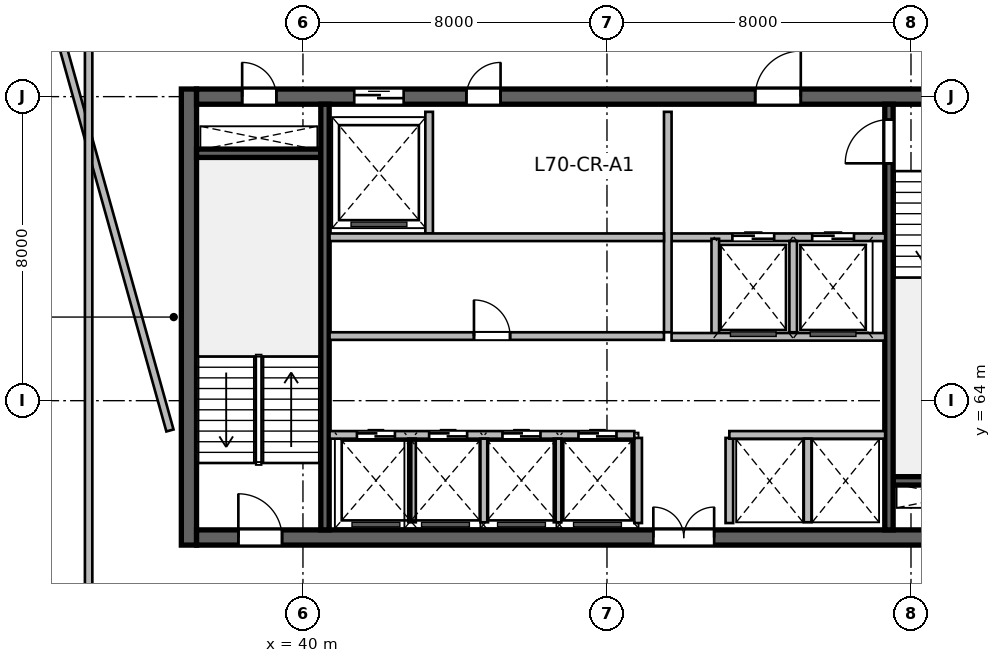
"""IFC4 building model, lengths in metres.
Left out: names, types, materials, properties, quantities, classifications, styles, units other than length and angle.
Written with IfcOpenShell. Run it as: python <this file> out.ifc"""

import sys

from ifc_helpers import new_model, si_unit, direction, frame, frame_2d, origin, place, context, subcontext, project, spatial, rectangle, extrude, source, transform, mapped, element, fill, save


model = new_model("IFC4")
c1 = context("Model", 3, precision=1e-05, world=origin(), true_north=direction((0.0, 1.0)))
c2 = subcontext(c1, "Body", "Model", "MODEL_VIEW")
j1 = project(units=[si_unit("LENGTHUNIT", "METRE"), si_unit("PLANEANGLEUNIT", "RADIAN")], contexts=[c1])
p1 = place(None, origin())
s1 = spatial("IfcSite", under=j1, at=p1, CompositionType="ELEMENT")
p2 = place(p1, origin())
s2 = spatial("IfcBuilding", under=s1, at=p2, CompositionType="ELEMENT")
p3 = place(p2, frame((0.0, 0.0, 287.4)))
s3 = spatial("IfcBuildingStorey", under=s2, at=p3, CompositionType="ELEMENT", Elevation=287.4)
m1 = source(origin(), c2, "Body", "SweptSolid", [
    extrude(rectangle(XDim=12.0, YDim=0.4, at=frame_2d((6.0, 0.0))), origin(), (0.0, 0.0, 1.0), 3.9),
])
p4 = place(p3, frame((37.0, 60.2, 0.0), z_axis=(0.0, 0.0, 1.0), x_axis=(0.0, 1.0, 0.0)))
e1 = element("IfcWall", 1, at=p4, inside=s3, PredefinedType="SHEAR", context=c2, shape_type="MappedRepresentation", body=[
    mapped(m1, transform((0.0, 0.0, 0.0), scale=1.0)),
])
m2 = source(origin(), c2, "Body", "SweptSolid", [
    extrude(rectangle(XDim=21.6, YDim=0.4, at=frame_2d((10.8, 0.0))), origin(), (0.0, 0.0, 1.0), 3.9),
])
p5 = place(p3, frame((37.2, 60.4, 0.0), z_axis=(0.0, 0.0, 1.0), x_axis=(1.0, 0.0, 0.0)))
e2 = element("IfcWall", 2, at=p5, inside=s3, PredefinedType="SHEAR", context=c2, shape_type="MappedRepresentation", body=[
    mapped(m2, transform((0.0, 0.0, 0.0), scale=1.0)),
])
p6 = place(p5, frame((1.1, 0.0, 0.0)))
e3 = element("IfcOpeningElement", 3, at=p6, cuts=e2, PredefinedType="OPENING", context=c2, shape_type="SweptSolid", body=[
    extrude(rectangle(XDim=1.15, YDim=2.15, at=frame_2d((0.575, 1.075))), frame((0.0, 0.21, 0.0), z_axis=(0.0, -1.0, 0.0), x_axis=(1.0, 0.0, 0.0)), (0.0, 0.0, 1.0), 0.42),
])
p7 = place(p5, frame((19.5, 0.0, 0.0)))
e4 = element("IfcOpeningElement", 4, at=p7, cuts=e2, PredefinedType="OPENING", context=c2, shape_type="SweptSolid", body=[
    extrude(rectangle(XDim=0.9, YDim=2.1, at=frame_2d((0.45, 1.05))), frame((0.0, 0.21, 0.0), z_axis=(0.0, -1.0, 0.0), x_axis=(1.0, 0.0, 0.0)), (0.0, 0.0, 1.0), 0.42),
])
p8 = place(p5, frame((12.02, 0.0, 0.0)))
e5 = element("IfcOpeningElement", 5, at=p8, cuts=e2, PredefinedType="OPENING", context=c2, shape_type="SweptSolid", body=[
    extrude(rectangle(XDim=1.6, YDim=2.15, at=frame_2d((0.8, 1.075))), frame((0.0, 0.21, 0.0), z_axis=(0.0, -1.0, 0.0), x_axis=(1.0, 0.0, 0.0)), (0.0, 0.0, 1.0), 0.42),
])
p9 = place(p3, frame((37.2, 72.0, 0.0), z_axis=(0.0, 0.0, 1.0), x_axis=(1.0, 0.0, 0.0)))
e6 = element("IfcWall", 6, at=p9, inside=s3, PredefinedType="SHEAR", context=c2, shape_type="MappedRepresentation", body=[
    mapped(m2, transform((0.0, 0.0, 0.0), scale=1.0)),
])
p10 = place(p9, frame((1.2, 0.0, 0.0)))
e7 = element("IfcOpeningElement", 7, at=p10, cuts=e6, PredefinedType="OPENING", context=c2, shape_type="SweptSolid", body=[
    extrude(rectangle(XDim=0.9, YDim=2.1, at=frame_2d((0.45, 1.05))), frame((0.0, 0.21, 0.0), z_axis=(0.0, -1.0, 0.0), x_axis=(1.0, 0.0, 0.0)), (0.0, 0.0, 1.0), 0.42),
])
p11 = place(p9, frame((14.7, 0.0, 0.0)))
e8 = element("IfcOpeningElement", 8, at=p11, cuts=e6, PredefinedType="OPENING", context=c2, shape_type="SweptSolid", body=[
    extrude(rectangle(XDim=1.2, YDim=2.15, at=frame_2d((0.6, 1.075))), frame((0.0, 0.21, 0.0), z_axis=(0.0, -1.0, 0.0), x_axis=(1.0, 0.0, 0.0)), (0.0, 0.0, 1.0), 0.42),
])
p12 = place(p9, frame((4.15, 0.0, 0.0)))
e9 = element("IfcOpeningElement", 9, at=p12, cuts=e6, PredefinedType="OPENING", context=c2, shape_type="SweptSolid", body=[
    extrude(rectangle(XDim=1.3, YDim=2.15, at=frame_2d((0.65, 1.075))), frame((0.0, 0.21, 0.0), z_axis=(0.0, -1.0, 0.0), x_axis=(1.0, 0.0, 0.0)), (0.0, 0.0, 1.0), 0.42),
])
p13 = place(p9, frame((7.1, 0.0, 0.0)))
e10 = element("IfcOpeningElement", 10, at=p13, cuts=e6, PredefinedType="OPENING", context=c2, shape_type="SweptSolid", body=[
    extrude(rectangle(XDim=0.9, YDim=2.1, at=frame_2d((0.45, 1.05))), frame((0.0, 0.21, 0.0), z_axis=(0.0, -1.0, 0.0), x_axis=(1.0, 0.0, 0.0)), (0.0, 0.0, 1.0), 0.42),
])
m3 = source(origin(), c2, "Body", "SweptSolid", [
    extrude(rectangle(XDim=3.27, YDim=0.22, at=frame_2d((1.635, 0.0))), origin(), (0.0, 0.0, 1.0), 3.9),
])
for number, where, z_axis, x_axis in (
    (11, (37.2, 70.51, 0.0), (0.0, 0.0, 1.0), (1.0, 0.0, 0.0)),
    (12, (55.53, 61.89, 0.0), (0.0, 0.0, 1.0), (1.0, 0.0, 0.0)),
):
    element("IfcWall", number, at=place(p3, frame(where, z_axis=z_axis, x_axis=x_axis)), inside=s3, PredefinedType="SHEAR", context=c2, shape_type="MappedRepresentation", body=[
        mapped(m3, transform((0.0, 0.0, 0.0), scale=1.0)),
    ])
m4 = source(origin(), c2, "Body", "SweptSolid", [
    extrude(rectangle(XDim=11.2, YDim=0.22, at=frame_2d((5.6, 0.0))), origin(), (0.0, 0.0, 1.0), 3.9),
])
p14 = place(p3, frame((40.58, 60.6, 0.0), z_axis=(0.0, 0.0, 1.0), x_axis=(0.0, 1.0, 0.0)))
e13 = element("IfcWall", 13, at=p14, inside=s3, PredefinedType="SHEAR", context=c2, shape_type="MappedRepresentation", body=[
    mapped(m4, transform((0.0, 0.0, 0.0), scale=1.0)),
])
p15 = place(p3, frame((55.42, 60.6, 0.0), z_axis=(0.0, 0.0, 1.0), x_axis=(0.0, 1.0, 0.0)))
e14 = element("IfcWall", 14, at=p15, inside=s3, PredefinedType="SHEAR", context=c2, shape_type="MappedRepresentation", body=[
    mapped(m4, transform((0.0, 0.0, 0.0), scale=1.0)),
])
p16 = place(p15, frame((9.645, 0.0, 0.0)))
e15 = element("IfcOpeningElement", 15, at=p16, cuts=e14, PredefinedType="OPENING", context=c2, shape_type="SweptSolid", body=[
    extrude(rectangle(XDim=1.15, YDim=2.15, at=frame_2d((0.575, 1.075))), frame((0.0, 0.12, 0.0), z_axis=(0.0, -1.0, 0.0), x_axis=(1.0, 0.0, 0.0)), (0.0, 0.0, 1.0), 0.24),
])
m5 = source(origin(), c2, "Body", "SweptSolid", [
    extrude(rectangle(XDim=2.24, YDim=0.2, at=frame_2d((1.12, 0.0))), origin(), (0.0, 0.0, 1.0), 3.64),
])
for number, where, z_axis, x_axis in (
    (16, (48.82, 60.78, 0.0), (0.0, 0.0, 1.0), (0.0, 1.0, 0.0)),
    (17, (51.22, 60.78, 0.0), (0.0, 0.0, 1.0), (0.0, 1.0, 0.0)),
):
    element("IfcWall", number, at=place(p3, frame(where, z_axis=z_axis, x_axis=x_axis)), inside=s3, PredefinedType="SOLIDWALL", context=c2, shape_type="MappedRepresentation", body=[
        mapped(m5, transform((0.0, 0.0, 0.0), scale=1.0)),
    ])
m6 = source(origin(), c2, "Body", "SweptSolid", [
    extrude(rectangle(XDim=5.62, YDim=0.2, at=frame_2d((2.81, 0.0))), origin(), (0.0, 0.0, 1.0), 3.64),
])
p17 = place(p3, frame((49.7, 68.3, 0.0), z_axis=(0.0, 0.0, 1.0), x_axis=(1.0, 0.0, 0.0)))
e18 = element("IfcWall", 18, at=p17, inside=s3, PredefinedType="SOLIDWALL", context=c2, shape_type="MappedRepresentation", body=[
    mapped(m6, transform((0.0, 0.0, 0.0), scale=1.0)),
])
p18 = place(p17, frame((1.6, 0.0, 0.0)))
e19 = element("IfcOpeningElement", 19, at=p18, cuts=e18, PredefinedType="OPENING", context=c2, shape_type="SweptSolid", body=[
    extrude(rectangle(XDim=1.1, YDim=2.15, at=frame_2d((0.55, 1.075))), frame((0.0, 0.11, 0.0), z_axis=(0.0, -1.0, 0.0), x_axis=(1.0, 0.0, 0.0)), (0.0, 0.0, 1.0), 0.22),
])
p19 = place(p17, frame((3.7, 0.0, 0.0)))
e20 = element("IfcOpeningElement", 20, at=p19, cuts=e18, PredefinedType="OPENING", context=c2, shape_type="SweptSolid", body=[
    extrude(rectangle(XDim=1.1, YDim=2.15, at=frame_2d((0.55, 1.075))), frame((0.0, 0.11, 0.0), z_axis=(0.0, -1.0, 0.0), x_axis=(1.0, 0.0, 0.0)), (0.0, 0.0, 1.0), 0.22),
])
m7 = source(origin(), c2, "Body", "SweptSolid", [
    extrude(rectangle(XDim=5.8, YDim=0.2, at=frame_2d((2.9, 0.0))), origin(), (0.0, 0.0, 1.0), 3.64),
])
p20 = place(p3, frame((49.6, 65.8, 0.0), z_axis=(0.0, 0.0, 1.0), x_axis=(0.0, 1.0, 0.0)))
e21 = element("IfcWall", 21, at=p20, inside=s3, PredefinedType="SOLIDWALL", context=c2, shape_type="MappedRepresentation", body=[
    mapped(m7, transform((0.0, 0.0, 0.0), scale=1.0)),
])
m8 = source(origin(), c2, "Body", "SweptSolid", [
    extrude(rectangle(XDim=2.58, YDim=0.2, at=frame_2d((1.29, 0.0))), origin(), (0.0, 0.0, 1.0), 3.64),
])
p21 = place(p3, frame((50.85, 65.68, 0.0), z_axis=(0.0, 0.0, 1.0), x_axis=(0.0, 1.0, 0.0)))
e22 = element("IfcWall", 22, at=p21, inside=s3, PredefinedType="SOLIDWALL", context=c2, shape_type="MappedRepresentation", body=[
    mapped(m8, transform((0.0, 0.0, 0.0), scale=1.0)),
])
m9 = source(origin(), c2, "Body", "SweptSolid", [
    extrude(rectangle(XDim=2.4, YDim=0.2, at=frame_2d((1.2, 0.0))), origin(), (0.0, 0.0, 1.0), 3.64),
])
p22 = place(p3, frame((52.9, 65.8, 0.0), z_axis=(0.0, 0.0, 1.0), x_axis=(0.0, 1.0, 0.0)))
e23 = element("IfcWall", 23, at=p22, inside=s3, PredefinedType="SOLIDWALL", context=c2, shape_type="MappedRepresentation", body=[
    mapped(m9, transform((0.0, 0.0, 0.0), scale=1.0)),
])
p23 = place(p3, frame((49.7, 65.68, 0.0), z_axis=(0.0, 0.0, 1.0), x_axis=(1.0, 0.0, 0.0)))
e24 = element("IfcWall", 24, at=p23, inside=s3, PredefinedType="SOLIDWALL", context=c2, shape_type="MappedRepresentation", body=[
    mapped(m6, transform((0.0, 0.0, 0.0), scale=1.0)),
])
m10 = source(origin(), c2, "Body", "SweptSolid", [
    extrude(rectangle(XDim=3.2, YDim=0.2, at=frame_2d((1.6, 0.0))), origin(), (0.0, 0.0, 1.0), 3.64),
])
p24 = place(p3, frame((43.32, 68.4, 0.0), z_axis=(0.0, 0.0, 1.0), x_axis=(0.0, 1.0, 0.0)))
e25 = element("IfcWall", 25, at=p24, inside=s3, PredefinedType="SOLIDWALL", context=c2, shape_type="MappedRepresentation", body=[
    mapped(m10, transform((0.0, 0.0, 0.0), scale=1.0)),
])
m11 = source(origin(), c2, "Body", "SweptSolid", [
    extrude(rectangle(XDim=8.8, YDim=0.2, at=frame_2d((4.4, 0.0))), origin(), (0.0, 0.0, 1.0), 3.64),
])
p25 = place(p3, frame((40.7, 68.3, 0.0), z_axis=(0.0, 0.0, 1.0), x_axis=(1.0, 0.0, 0.0)))
e26 = element("IfcWall", 26, at=p25, inside=s3, PredefinedType="SOLIDWALL", context=c2, shape_type="MappedRepresentation", body=[
    mapped(m11, transform((0.0, 0.0, 0.0), scale=1.0)),
])
m12 = source(origin(), c2, "Body", "SweptSolid", [
    extrude(rectangle(XDim=8.02, YDim=0.2, at=frame_2d((4.01, 0.0))), origin(), (0.0, 0.0, 1.0), 3.64),
])
p26 = place(p3, frame((40.7, 63.1, 0.0), z_axis=(0.0, 0.0, 1.0), x_axis=(1.0, 0.0, 0.0)))
e27 = element("IfcWall", 27, at=p26, inside=s3, PredefinedType="SOLIDWALL", context=c2, shape_type="MappedRepresentation", body=[
    mapped(m12, transform((0.0, 0.0, 0.0), scale=1.0)),
])
p27 = place(p26, frame((0.72, 0.0, 0.0)))
e28 = element("IfcOpeningElement", 28, at=p27, cuts=e27, PredefinedType="OPENING", context=c2, shape_type="SweptSolid", body=[
    extrude(rectangle(XDim=1.0, YDim=2.15, at=frame_2d((0.5, 1.075))), frame((0.0, 0.11, 0.0), z_axis=(0.0, -1.0, 0.0), x_axis=(1.0, 0.0, 0.0)), (0.0, 0.0, 1.0), 0.22),
])
p28 = place(p26, frame((2.62, 0.0, 0.0)))
e29 = element("IfcOpeningElement", 29, at=p28, cuts=e27, PredefinedType="OPENING", context=c2, shape_type="SweptSolid", body=[
    extrude(rectangle(XDim=1.0, YDim=2.15, at=frame_2d((0.5, 1.075))), frame((0.0, 0.11, 0.0), z_axis=(0.0, -1.0, 0.0), x_axis=(1.0, 0.0, 0.0)), (0.0, 0.0, 1.0), 0.22),
])
p29 = place(p26, frame((4.55, 0.0, 0.0)))
e30 = element("IfcOpeningElement", 30, at=p29, cuts=e27, PredefinedType="OPENING", context=c2, shape_type="SweptSolid", body=[
    extrude(rectangle(XDim=1.0, YDim=2.15, at=frame_2d((0.5, 1.075))), frame((0.0, 0.11, 0.0), z_axis=(0.0, -1.0, 0.0), x_axis=(1.0, 0.0, 0.0)), (0.0, 0.0, 1.0), 0.22),
])
p30 = place(p26, frame((6.55, 0.0, 0.0)))
e31 = element("IfcOpeningElement", 31, at=p30, cuts=e27, PredefinedType="OPENING", context=c2, shape_type="SweptSolid", body=[
    extrude(rectangle(XDim=1.0, YDim=2.15, at=frame_2d((0.5, 1.075))), frame((0.0, 0.11, 0.0), z_axis=(0.0, -1.0, 0.0), x_axis=(1.0, 0.0, 0.0)), (0.0, 0.0, 1.0), 0.22),
])
m13 = source(origin(), c2, "Body", "SweptSolid", [
    extrude(rectangle(XDim=4.1, YDim=0.2, at=frame_2d((2.05, 0.0))), origin(), (0.0, 0.0, 1.0), 3.64),
])
p31 = place(p3, frame((51.22, 63.1, 0.0), z_axis=(0.0, 0.0, 1.0), x_axis=(1.0, 0.0, 0.0)))
e32 = element("IfcWall", 32, at=p31, inside=s3, PredefinedType="SOLIDWALL", context=c2, shape_type="MappedRepresentation", body=[
    mapped(m13, transform((0.0, 0.0, 0.0), scale=1.0)),
])
m14 = source(origin(), c2, "Body", "SweptSolid", [
    extrude(rectangle(XDim=2.2, YDim=0.2, at=frame_2d((1.1, 0.0))), origin(), (0.0, 0.0, 1.0), 3.64),
])
for number, where, z_axis, x_axis in (
    (33, (42.87, 60.8, 0.0), (0.0, 0.0, 1.0), (0.0, 1.0, 0.0)),
    (34, (44.77, 60.8, 0.0), (0.0, 0.0, 1.0), (0.0, 1.0, 0.0)),
    (35, (46.7, 60.8, 0.0), (0.0, 0.0, 1.0), (0.0, 1.0, 0.0)),
    (36, (53.28, 60.8, 0.0), (0.0, 0.0, 1.0), (0.0, 1.0, 0.0)),
):
    element("IfcWall", number, at=place(p3, frame(where, z_axis=z_axis, x_axis=x_axis)), inside=s3, PredefinedType="SOLIDWALL", context=c2, shape_type="MappedRepresentation", body=[
        mapped(m14, transform((0.0, 0.0, 0.0), scale=1.0)),
    ])
p32 = place(p3, frame((40.7, 65.7, 0.0), z_axis=(0.0, 0.0, 1.0), x_axis=(1.0, 0.0, 0.0)))
e37 = element("IfcWall", 37, at=p32, inside=s3, PredefinedType="SOLIDWALL", context=c2, shape_type="MappedRepresentation", body=[
    mapped(m11, transform((0.0, 0.0, 0.0), scale=1.0)),
])
p33 = place(p32, frame((3.8, 0.0, 0.0)))
e38 = element("IfcOpeningElement", 38, at=p33, cuts=e37, PredefinedType="OPENING", context=c2, shape_type="SweptSolid", body=[
    extrude(rectangle(XDim=0.95, YDim=2.15, at=frame_2d((0.475, 1.075))), frame((0.0, 0.11, 0.0), z_axis=(0.0, -1.0, 0.0), x_axis=(1.0, 0.0, 0.0)), (0.0, 0.0, 1.0), 0.22),
])
m15 = source(origin(), c2, "Body", "SweptSolid", [
    extrude(rectangle(XDim=17.556, YDim=0.195, at=frame_2d((8.778, 0.0))), origin(), (0.0, 0.0, 1.0), 3.64),
])
p34 = place(p3, frame((33.8, 54.958, 0.0), z_axis=(0.0, 0.0, 1.0), x_axis=(-0.395687598313, 0.918385172213, 0.0)))
e39 = element("IfcWall", 39, at=p34, inside=s3, PredefinedType="PARTITIONING", context=c2, shape_type="MappedRepresentation", body=[
    mapped(m15, transform((0.0, 0.0, 0.0), scale=1.0)),
])
m16 = source(origin(), c2, "Body", "SweptSolid", [
    extrude(rectangle(XDim=12.311, YDim=0.195, at=frame_2d((6.155, 0.0))), origin(), (0.0, 0.0, 1.0), 3.64),
])
p35 = place(p3, frame((36.5, 63.216, 0.0), z_axis=(0.0, 0.0, 1.0), x_axis=(-0.268759602651, 0.963207286093, 0.0)))
e40 = element("IfcWall", 40, at=p35, inside=s3, PredefinedType="PARTITIONING", context=c2, shape_type="MappedRepresentation", body=[
    mapped(m16, transform((0.0, 0.0, 0.0), scale=1.0)),
])
m17 = source(origin(), c2, "Body", "SweptSolid", [
    extrude(rectangle(XDim=17.681, YDim=0.195, at=frame_2d((8.84, 0.0))), origin(), (0.0, 0.0, 1.0), 3.64),
])
p36 = place(p3, frame((34.36, 57.96, 0.0), z_axis=(0.0, 0.0, 1.0), x_axis=(0.0, 1.0, 0.0)))
e41 = element("IfcWall", 41, at=p36, inside=s3, PredefinedType="PARTITIONING", context=c2, shape_type="MappedRepresentation", body=[
    mapped(m17, transform((0.0, 0.0, 0.0), scale=1.0)),
])
m18 = source(origin(), c2, "Body", "SweptSolid", [
    extrude(rectangle(XDim=1.15, YDim=2.15, at=frame_2d((0.575, 1.075))), frame((0.0, 0.025, 0.0), z_axis=(0.0, -1.0, 0.0), x_axis=(1.0, 0.0, 0.0)), (0.0, 0.0, 1.0), 0.05),
])
p37 = place(p6, origin())
e42 = element("IfcDoor", 42, at=p37, inside=s3, OperationType="SINGLE_SWING_LEFT", PredefinedType="DOOR", context=c2, shape_type="MappedRepresentation", body=[
    mapped(m18, transform((0.0, 0.0, 0.0), scale=1.0)),
])
fill(e3, e42)
m19 = source(origin(), c2, "Body", "SweptSolid", [
    extrude(rectangle(XDim=0.9, YDim=2.1, at=frame_2d((0.45, 1.05))), frame((0.0, 0.025, 0.0), z_axis=(0.0, -1.0, 0.0), x_axis=(1.0, 0.0, 0.0)), (0.0, 0.0, 1.0), 0.05),
])
p38 = place(p10, origin())
e43 = element("IfcDoor", 43, at=p38, inside=s3, OperationType="SINGLE_SWING_LEFT", PredefinedType="DOOR", context=c2, shape_type="MappedRepresentation", body=[
    mapped(m19, transform((0.0, 0.0, 0.0), scale=1.0)),
])
fill(e7, e43)
p39 = place(p16, origin())
e44 = element("IfcDoor", 44, at=p39, inside=s3, OperationType="SINGLE_SWING_LEFT", PredefinedType="DOOR", context=c2, shape_type="MappedRepresentation", body=[
    mapped(m18, transform((0.0, 0.0, 0.0), scale=1.0)),
])
fill(e15, e44)
m20 = source(origin(), c2, "Body", "SweptSolid", [
    extrude(rectangle(XDim=1.6, YDim=2.15, at=frame_2d((0.8, 1.075))), frame((0.0, 0.025, 0.0), z_axis=(0.0, -1.0, 0.0), x_axis=(1.0, 0.0, 0.0)), (0.0, 0.0, 1.0), 0.05),
])
p40 = place(p8, origin())
e45 = element("IfcDoor", 45, at=p40, inside=s3, OperationType="DOUBLE_DOOR_SINGLE_SWING", PredefinedType="DOOR", context=c2, shape_type="MappedRepresentation", body=[
    mapped(m20, transform((0.0, 0.0, 0.0), scale=1.0)),
])
fill(e5, e45)
m21 = source(origin(), c2, "Body", "SweptSolid", [
    extrude(rectangle(XDim=1.2, YDim=2.15, at=frame_2d((0.6, 1.075))), frame((0.0, 0.025, 0.0), z_axis=(0.0, -1.0, 0.0), x_axis=(1.0, 0.0, 0.0)), (0.0, 0.0, 1.0), 0.05),
])
p41 = place(p11, origin())
e46 = element("IfcDoor", 46, at=p41, inside=s3, OperationType="SINGLE_SWING_RIGHT", PredefinedType="DOOR", context=c2, shape_type="MappedRepresentation", body=[
    mapped(m21, transform((0.0, 0.0, 0.0), scale=1.0)),
])
fill(e8, e46)
m22 = source(origin(), c2, "Body", "SweptSolid", [
    extrude(rectangle(XDim=1.1, YDim=2.15, at=frame_2d((0.55, 1.075))), frame((0.0, 0.025, 0.0), z_axis=(0.0, -1.0, 0.0), x_axis=(1.0, 0.0, 0.0)), (0.0, 0.0, 1.0), 0.05),
])
p42 = place(p18, origin())
e47 = element("IfcDoor", 47, at=p42, inside=s3, OperationType="DOUBLE_DOOR_SLIDING", PredefinedType="DOOR", context=c2, shape_type="MappedRepresentation", body=[
    mapped(m22, transform((0.0, 0.0, 0.0), scale=1.0)),
])
fill(e19, e47)
p43 = place(p19, origin())
e48 = element("IfcDoor", 48, at=p43, inside=s3, OperationType="DOUBLE_DOOR_SLIDING", PredefinedType="DOOR", context=c2, shape_type="MappedRepresentation", body=[
    mapped(m22, transform((0.0, 0.0, 0.0), scale=1.0)),
])
fill(e20, e48)
m23 = source(origin(), c2, "Body", "SweptSolid", [
    extrude(rectangle(XDim=1.3, YDim=2.15, at=frame_2d((0.65, 1.075))), frame((0.0, 0.025, 0.0), z_axis=(0.0, -1.0, 0.0), x_axis=(1.0, 0.0, 0.0)), (0.0, 0.0, 1.0), 0.05),
])
p44 = place(p12, origin())
e49 = element("IfcDoor", 49, at=p44, inside=s3, OperationType="DOUBLE_DOOR_SLIDING", PredefinedType="DOOR", context=c2, shape_type="MappedRepresentation", body=[
    mapped(m23, transform((0.0, 0.0, 0.0), scale=1.0)),
])
fill(e9, e49)
p45 = place(p13, origin())
e50 = element("IfcDoor", 50, at=p45, inside=s3, OperationType="SINGLE_SWING_RIGHT", PredefinedType="DOOR", context=c2, shape_type="MappedRepresentation", body=[
    mapped(m19, transform((0.0, 0.0, 0.0), scale=1.0)),
])
fill(e10, e50)
m24 = source(origin(), c2, "Body", "SweptSolid", [
    extrude(rectangle(XDim=1.0, YDim=2.15, at=frame_2d((0.5, 1.075))), frame((0.0, 0.025, 0.0), z_axis=(0.0, -1.0, 0.0), x_axis=(1.0, 0.0, 0.0)), (0.0, 0.0, 1.0), 0.05),
])
p46 = place(p27, origin())
e51 = element("IfcDoor", 51, at=p46, inside=s3, OperationType="DOUBLE_DOOR_SLIDING", PredefinedType="DOOR", context=c2, shape_type="MappedRepresentation", body=[
    mapped(m24, transform((0.0, 0.0, 0.0), scale=1.0)),
])
fill(e28, e51)
p47 = place(p28, origin())
e52 = element("IfcDoor", 52, at=p47, inside=s3, OperationType="DOUBLE_DOOR_SLIDING", PredefinedType="DOOR", context=c2, shape_type="MappedRepresentation", body=[
    mapped(m24, transform((0.0, 0.0, 0.0), scale=1.0)),
])
fill(e29, e52)
p48 = place(p29, origin())
e53 = element("IfcDoor", 53, at=p48, inside=s3, OperationType="DOUBLE_DOOR_SLIDING", PredefinedType="DOOR", context=c2, shape_type="MappedRepresentation", body=[
    mapped(m24, transform((0.0, 0.0, 0.0), scale=1.0)),
])
fill(e30, e53)
p49 = place(p30, origin())
e54 = element("IfcDoor", 54, at=p49, inside=s3, OperationType="DOUBLE_DOOR_SLIDING", PredefinedType="DOOR", context=c2, shape_type="MappedRepresentation", body=[
    mapped(m24, transform((0.0, 0.0, 0.0), scale=1.0)),
])
fill(e31, e54)
m25 = source(origin(), c2, "Body", "SweptSolid", [
    extrude(rectangle(XDim=0.95, YDim=2.15, at=frame_2d((0.475, 1.075))), frame((0.0, 0.025, 0.0), z_axis=(0.0, -1.0, 0.0), x_axis=(1.0, 0.0, 0.0)), (0.0, 0.0, 1.0), 0.05),
])
p50 = place(p33, origin())
e55 = element("IfcDoor", 55, at=p50, inside=s3, OperationType="SINGLE_SWING_LEFT", PredefinedType="DOOR", context=c2, shape_type="MappedRepresentation", body=[
    mapped(m25, transform((0.0, 0.0, 0.0), scale=1.0)),
])
fill(e38, e55)
save(model, sys.argv[1])
